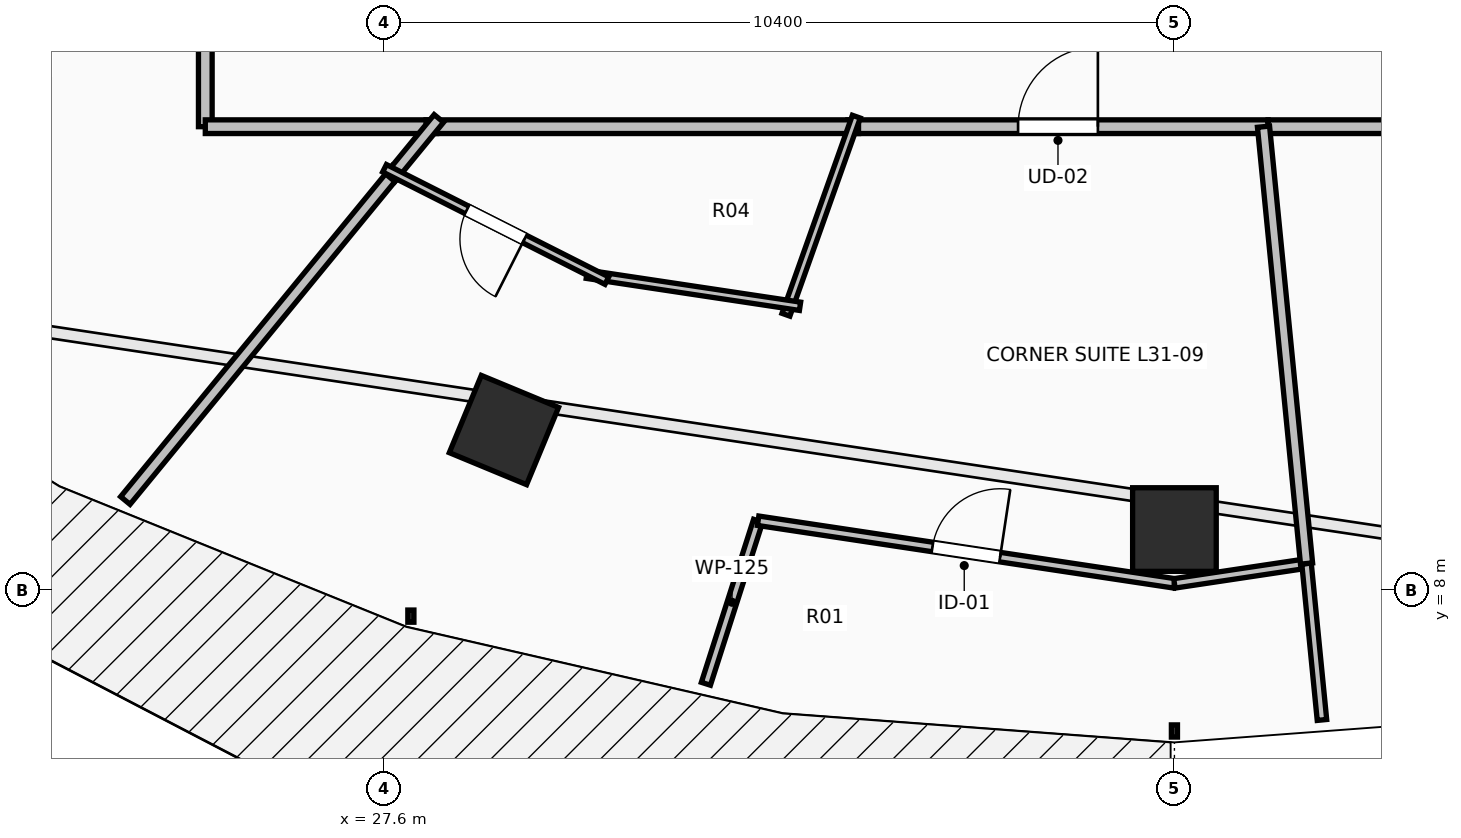
"""IFC4 building model, lengths in metres.
Left out: names, types, materials, properties, quantities, classifications, styles, units other than length and angle.
Written with IfcOpenShell. Run it as: python <this file> out.ifc"""

import sys

from ifc_helpers import new_model, si_unit, direction, frame, frame_2d, origin, origin_2d, place, context, subcontext, project, spatial, rectangle, extrude, element, fill, save


model = new_model("IFC4")
c1 = context("Model", 3, precision=1e-05, world=origin(), true_north=direction((0.0, 1.0)))
c2 = subcontext(c1, "Body", "Model", "MODEL_VIEW")
j1 = project(units=[si_unit("LENGTHUNIT", "METRE"), si_unit("PLANEANGLEUNIT", "RADIAN")], contexts=[c1])
p1 = place(None, origin())
s1 = spatial("IfcSite", under=j1, at=p1, CompositionType="ELEMENT")
p2 = place(p1, origin())
s2 = spatial("IfcBuilding", under=s1, at=p2, CompositionType="ELEMENT")
p3 = place(p2, frame((0.0, 0.0, 117.3)))
s3 = spatial("IfcBuildingStorey", under=s2, at=p3, CompositionType="ELEMENT", Elevation=117.3)
for number, where, z_axis, x_axis in (
    (1, (29.179, 10.109, 0.0), (0.0, 0.0, 1.0), (-0.383, -0.924, 0.0)),
    (2, (38.0, 8.8, 0.0), (0.0, 0.0, 1.0), (0.0, -1.0, 0.0)),
):
    element("IfcColumn", number, at=place(p3, frame(where, z_axis=z_axis, x_axis=x_axis)), inside=s3, PredefinedType="COLUMN", context=c2, shape_type="SweptSolid", body=[
        extrude(rectangle(XDim=1.1, YDim=1.1, at=origin_2d()), origin(), (0.0, 0.0, 1.0), 3.5),
    ])
p4 = place(p3, frame((25.25, 18.178, 0.0), z_axis=(0.0, 0.0, 1.0), x_axis=(0.0, -1.0, 0.0)))
e3 = element("IfcWall", 3, at=p4, inside=s3, PredefinedType="PARTITIONING", context=c2, shape_type="SweptSolid", body=[
    extrude(rectangle(XDim=4.078, YDim=0.18, at=frame_2d((2.039, 0.0))), origin(), (0.0, 0.0, 1.0), 2.432),
])
p5 = place(p4, frame((1.514, 0.0, 0.0)))
e4 = element("IfcOpeningElement", 4, at=p5, cuts=e3, PredefinedType="OPENING", context=c2, shape_type="SweptSolid", body=[
    extrude(rectangle(XDim=1.05, YDim=2.2, at=frame_2d((0.525, 1.1))), frame((0.0, 0.105, 0.0), z_axis=(0.0, -1.0, 0.0), x_axis=(1.0, 0.0, 0.0)), (0.0, 0.0, 1.0), 0.21),
])
p6 = place(p3, frame((25.25, 14.1, 0.0), z_axis=(0.0, 0.0, 1.0), x_axis=(1.0, 0.0, 0.0)))
e5 = element("IfcWall", 5, at=p6, inside=s3, PredefinedType="PARTITIONING", context=c2, shape_type="SweptSolid", body=[
    extrude(rectangle(XDim=3.044, YDim=0.18, at=frame_2d((1.522, 0.0))), origin(), (0.0, 0.0, 1.0), 2.432),
])
p7 = place(p3, frame((33.704, 14.1, 0.0), z_axis=(0.0, 0.0, 1.0), x_axis=(1.0, 0.0, 0.0)))
e6 = element("IfcWall", 6, at=p7, inside=s3, PredefinedType="PARTITIONING", context=c2, shape_type="SweptSolid", body=[
    extrude(rectangle(XDim=5.528, YDim=0.18, at=frame_2d((2.764, 0.0))), origin(), (0.0, 0.0, 1.0), 2.874),
])
p8 = place(p7, frame((2.239, 0.0, 0.0)))
e7 = element("IfcOpeningElement", 7, at=p8, cuts=e6, PredefinedType="OPENING", context=c2, shape_type="SweptSolid", body=[
    extrude(rectangle(XDim=1.05, YDim=2.2, at=frame_2d((0.525, 1.1))), frame((0.0, 0.105, 0.0), z_axis=(0.0, -1.0, 0.0), x_axis=(1.0, 0.0, 0.0)), (0.0, 0.0, 1.0), 0.21),
])
p9 = place(p3, frame((28.154, 14.1, 0.0), z_axis=(0.0, 0.0, 1.0), x_axis=(1.0, 0.0, 0.0)))
e8 = element("IfcWall", 8, at=p9, inside=s3, PredefinedType="PARTITIONING", context=c2, shape_type="SweptSolid", body=[
    extrude(rectangle(XDim=5.69, YDim=0.18, at=frame_2d((2.845, 0.0))), origin(), (0.0, 0.0, 1.0), 2.432),
])
p10 = place(p3, frame((39.232, 14.1, 0.0), z_axis=(0.0, 0.0, 1.0), x_axis=(1.0, 0.0, 0.0)))
e9 = element("IfcWall", 9, at=p10, inside=s3, PredefinedType="PARTITIONING", context=c2, shape_type="SweptSolid", body=[
    extrude(rectangle(XDim=2.968, YDim=0.18, at=frame_2d((1.484, 0.0))), origin(), (0.0, 0.0, 1.0), 2.874),
])
p11 = place(p3, frame((24.198, 9.182, 0.0), z_axis=(0.0, 0.0, 1.0), x_axis=(0.634365086516, 0.773033593713, 0.0)))
e10 = element("IfcWall", 10, at=p11, inside=s3, PredefinedType="PARTITIONING", context=c2, shape_type="SweptSolid", body=[
    extrude(rectangle(XDim=5.634, YDim=0.16, at=frame_2d((2.817, 0.0))), origin(), (0.0, 0.0, 1.0), 2.677),
])
p12 = place(p3, frame((27.683, 13.429, 0.0), z_axis=(0.0, 0.0, 1.0), x_axis=(0.634186727441, 0.77317992391, 0.0)))
e11 = element("IfcWall", 11, at=p12, inside=s3, PredefinedType="PARTITIONING", context=c2, shape_type="SweptSolid", body=[
    extrude(rectangle(XDim=1.008, YDim=0.16, at=frame_2d((0.504, 0.0))), origin(), (0.0, 0.0, 1.0), 2.432),
])
p13 = place(p3, frame((33.815, 14.232, 0.0), z_axis=(0.0, 0.0, 1.0), x_axis=(-0.334786713612, -0.942293933117, 0.0)))
e12 = element("IfcWall", 12, at=p13, inside=s3, PredefinedType="PARTITIONING", context=c2, shape_type="SweptSolid", body=[
    extrude(rectangle(XDim=2.765, YDim=0.11, at=frame_2d((1.383, 0.0))), origin(), (0.0, 0.0, 1.0), 2.874),
])
p14 = place(p3, frame((33.074, 11.737, 0.0), z_axis=(0.0, 0.0, 1.0), x_axis=(-0.988902866222, 0.148563525729, 0.0)))
e13 = element("IfcWall", 13, at=p14, inside=s3, PredefinedType="PARTITIONING", context=c2, shape_type="SweptSolid", body=[
    extrude(rectangle(XDim=2.836, YDim=0.11, at=frame_2d((1.418, 0.0))), origin(), (0.0, 0.0, 1.0), 3.24),
])
p15 = place(p3, frame((30.533, 12.075, 0.0), z_axis=(0.0, 0.0, 1.0), x_axis=(-0.892451870397, 0.451142614952, 0.0)))
e14 = element("IfcWall", 14, at=p15, inside=s3, PredefinedType="PARTITIONING", context=c2, shape_type="SweptSolid", body=[
    extrude(rectangle(XDim=3.277, YDim=0.11, at=frame_2d((1.639, 0.0))), origin(), (0.0, 0.0, 1.0), 2.432),
])
p16 = place(p15, frame((1.214, 0.0, 0.0)))
e15 = element("IfcOpeningElement", 15, at=p16, cuts=e14, PredefinedType="OPENING", context=c2, shape_type="SweptSolid", body=[
    extrude(rectangle(XDim=0.85, YDim=2.1, at=frame_2d((0.425, 1.05))), frame((0.0, 0.07, 0.0), z_axis=(0.0, -1.0, 0.0), x_axis=(1.0, 0.0, 0.0)), (0.0, 0.0, 1.0), 0.14),
])
p17 = place(p3, frame((31.836, 6.771, 0.0), z_axis=(0.0, 0.0, 1.0), x_axis=(0.305019563363, 0.952346085184, 0.0)))
e16 = element("IfcWall", 16, at=p17, inside=s3, PredefinedType="PARTITIONING", context=c2, shape_type="SweptSolid", body=[
    extrude(rectangle(XDim=2.252, YDim=0.125, at=frame_2d((1.126, 0.0))), origin(), (0.0, 0.0, 1.0), 3.24),
])
p18 = place(p3, frame((32.523, 8.916, 0.0), z_axis=(0.0, 0.0, 1.0), x_axis=(0.988872243588, -0.148767220385, 0.0)))
e17 = element("IfcWall", 17, at=p18, inside=s3, PredefinedType="PARTITIONING", context=c2, shape_type="SweptSolid", body=[
    extrude(rectangle(XDim=5.539, YDim=0.125, at=frame_2d((2.769, 0.0))), origin(), (0.0, 0.0, 1.0), 3.24),
])
p19 = place(p18, frame((2.319, 0.0, 0.0)))
e18 = element("IfcOpeningElement", 18, at=p19, cuts=e17, PredefinedType="OPENING", context=c2, shape_type="SweptSolid", body=[
    extrude(rectangle(XDim=0.9, YDim=2.1, at=frame_2d((0.45, 1.05))), frame((0.0, 0.077, 0.0), z_axis=(0.0, -1.0, 0.0), x_axis=(1.0, 0.0, 0.0)), (0.0, 0.0, 1.0), 0.155),
])
p20 = place(p3, frame((38.0, 8.092, 0.0), z_axis=(0.0, 0.0, 1.0), x_axis=(0.988912905534, 0.148496684368, 0.0)))
e19 = element("IfcWall", 19, at=p20, inside=s3, PredefinedType="PARTITIONING", context=c2, shape_type="SweptSolid", body=[
    extrude(rectangle(XDim=1.758, YDim=0.125, at=frame_2d((0.879, 0.0))), origin(), (0.0, 0.0, 1.0), 3.24),
])
p21 = place(p3, frame((39.738, 8.353, 0.0), z_axis=(0.0, 0.0, 1.0), x_axis=(0.098101024823, -0.995176461201, 0.0)))
e20 = element("IfcWall", 20, at=p21, inside=s3, PredefinedType="PARTITIONING", context=c2, shape_type="SweptSolid", body=[
    extrude(rectangle(XDim=2.068, YDim=0.125, at=frame_2d((1.034, 0.0))), origin(), (0.0, 0.0, 1.0), 3.24),
])
p22 = place(p3, frame((39.738, 8.353, 0.0), z_axis=(0.0, 0.0, 1.0), x_axis=(-0.098038593066, 0.995182613529, 0.0)))
e21 = element("IfcWall", 21, at=p22, inside=s3, PredefinedType="PARTITIONING", context=c2, shape_type="SweptSolid", body=[
    extrude(rectangle(XDim=5.775, YDim=0.16, at=frame_2d((2.887, 0.0))), origin(), (0.0, 0.0, 1.0), 2.432),
])
p23 = place(p8, origin())
e22 = element("IfcDoor", 22, at=p23, inside=s3, OperationType="SINGLE_SWING_RIGHT", PredefinedType="DOOR", context=c2, shape_type="SweptSolid", body=[
    extrude(rectangle(XDim=1.05, YDim=2.2, at=frame_2d((0.525, 1.1))), frame((0.0, 0.025, 0.0), z_axis=(0.0, -1.0, 0.0), x_axis=(1.0, 0.0, 0.0)), (0.0, 0.0, 1.0), 0.05),
])
fill(e7, e22)
p24 = place(p16, origin())
e23 = element("IfcDoor", 23, at=p24, inside=s3, OperationType="SINGLE_SWING_LEFT", PredefinedType="DOOR", context=c2, shape_type="SweptSolid", body=[
    extrude(rectangle(XDim=0.85, YDim=2.1, at=frame_2d((0.425, 1.05))), frame((0.0, 0.025, 0.0), z_axis=(0.0, -1.0, 0.0), x_axis=(1.0, 0.0, 0.0)), (0.0, 0.0, 1.0), 0.05),
])
fill(e15, e23)
p25 = place(p19, origin())
e24 = element("IfcDoor", 24, at=p25, inside=s3, OperationType="SINGLE_SWING_RIGHT", PredefinedType="DOOR", context=c2, shape_type="SweptSolid", body=[
    extrude(rectangle(XDim=0.9, YDim=2.1, at=frame_2d((0.45, 1.05))), frame((0.0, 0.025, 0.0), z_axis=(0.0, -1.0, 0.0), x_axis=(1.0, 0.0, 0.0)), (0.0, 0.0, 1.0), 0.05),
])
fill(e18, e24)
save(model, sys.argv[1])
